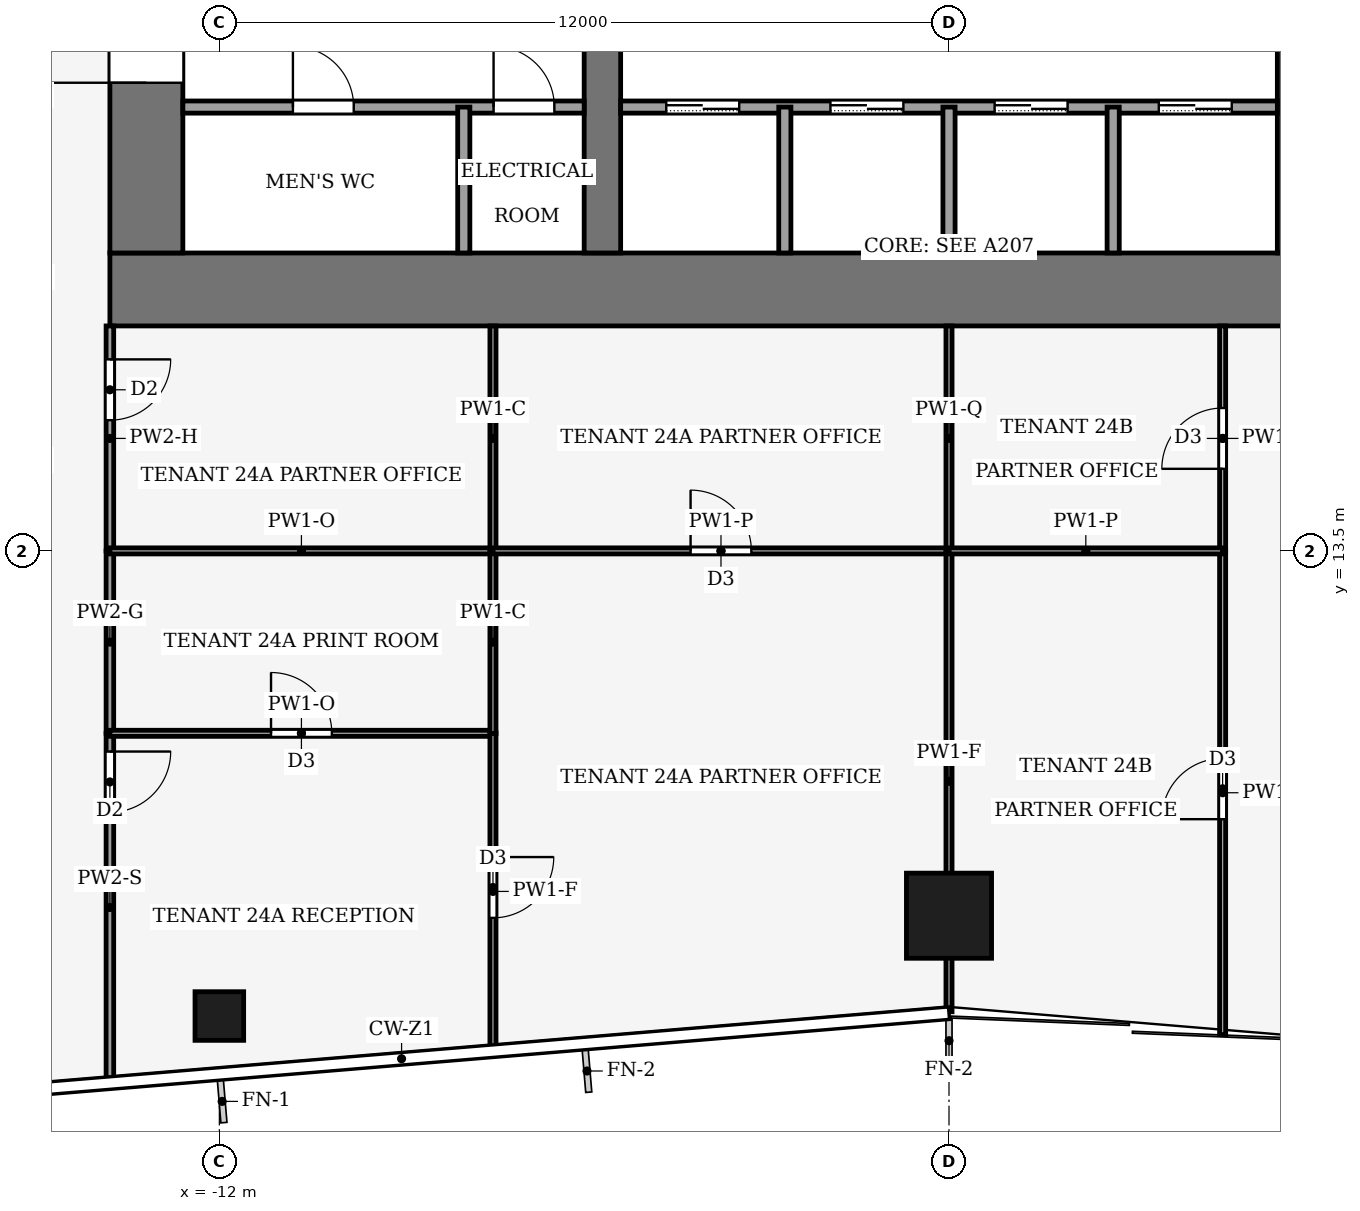
"""IFC4 building model, lengths in metres.
Left out: names, types, materials, properties, quantities, classifications, styles, units other than length and angle.
Written with IfcOpenShell. Run it as: python <this file> out.ifc"""

import sys

from ifc_helpers import new_model, si_unit, direction, frame, frame_2d, origin, origin_2d, place, context, subcontext, project, spatial, rectangle, hollow_rectangle, extrude, element, fill, save


model = new_model("IFC4")
c1 = context("Model", 3, precision=1e-05, world=origin(), true_north=direction((0.0, 1.0)))
c2 = subcontext(c1, "Body", "Model", "MODEL_VIEW")
j1 = project(units=[si_unit("LENGTHUNIT", "METRE"), si_unit("PLANEANGLEUNIT", "RADIAN")], contexts=[c1])
p1 = place(None, origin())
s1 = spatial("IfcSite", under=j1, at=p1, CompositionType="ELEMENT")
p2 = place(p1, origin())
s2 = spatial("IfcBuilding", under=s1, at=p2, CompositionType="ELEMENT")
p3 = place(p2, frame((0.0, 0.0, 106.0)))
s3 = spatial("IfcBuildingStorey", under=s2, at=p3, CompositionType="ELEMENT", Elevation=106.0)
p4 = place(p3, frame((-13.8, 17.8, -0.13), z_axis=(0.0, 0.0, 1.0), x_axis=(1.0, 0.0, 0.0)))
e1 = element("IfcWall", 1, at=p4, inside=s3, PredefinedType="SHEAR", context=c2, shape_type="SweptSolid", body=[
    extrude(rectangle(XDim=27.6, YDim=1.2, at=frame_2d((13.8, 0.0))), origin(), (0.0, 0.0, 1.0), 4.0),
])
p5 = place(p3, frame((-13.2, 18.4, -0.13), z_axis=(0.0, 0.0, 1.0), x_axis=(0.0, 1.0, 0.0)))
e2 = element("IfcWall", 2, at=p5, inside=s3, PredefinedType="SHEAR", context=c2, shape_type="SweptSolid", body=[
    extrude(rectangle(XDim=19.2, YDim=1.2, at=frame_2d((9.6, 0.0))), origin(), (0.0, 0.0, 1.0), 4.0),
])
p6 = place(p5, frame((2.8, 0.0, 0.13)))
e3 = element("IfcOpeningElement", 3, at=p6, cuts=e2, PredefinedType="OPENING", context=c2, shape_type="SweptSolid", body=[
    extrude(rectangle(XDim=2.4, YDim=2.4, at=frame_2d((1.2, 1.2))), frame((0.0, 0.61, 0.0), z_axis=(0.0, -1.0, 0.0), x_axis=(1.0, 0.0, 0.0)), (0.0, 0.0, 1.0), 1.22),
])
p7 = place(p5, frame((13.4, 0.0, 0.13)))
e4 = element("IfcOpeningElement", 4, at=p7, cuts=e2, PredefinedType="OPENING", context=c2, shape_type="SweptSolid", body=[
    extrude(rectangle(XDim=1.4, YDim=2.2, at=frame_2d((0.7, 1.1))), frame((0.0, 0.61, 0.0), z_axis=(0.0, -1.0, 0.0), x_axis=(1.0, 0.0, 0.0)), (0.0, 0.0, 1.0), 1.22),
])
p8 = place(p3, frame((-5.7, 18.4, -0.13), z_axis=(0.0, 0.0, 1.0), x_axis=(0.0, 1.0, 0.0)))
e5 = element("IfcWall", 5, at=p8, inside=s3, PredefinedType="SHEAR", context=c2, shape_type="SweptSolid", body=[
    extrude(rectangle(XDim=19.2, YDim=0.6, at=frame_2d((9.6, 0.0))), origin(), (0.0, 0.0, 1.0), 4.0),
])
p9 = place(p8, frame((8.35, 0.0, 0.13)))
e6 = element("IfcOpeningElement", 6, at=p9, cuts=e5, PredefinedType="OPENING", context=c2, shape_type="SweptSolid", body=[
    extrude(rectangle(XDim=0.9, YDim=2.1, at=frame_2d((0.45, 1.05))), frame((0.0, 0.31, 0.0), z_axis=(0.0, -1.0, 0.0), x_axis=(1.0, 0.0, 0.0)), (0.0, 0.0, 1.0), 0.62),
])
p10 = place(p3, frame((5.7, 18.4, -0.13), z_axis=(0.0, 0.0, 1.0), x_axis=(0.0, 1.0, 0.0)))
e7 = element("IfcWall", 7, at=p10, inside=s3, PredefinedType="SHEAR", context=c2, shape_type="SweptSolid", body=[
    extrude(rectangle(XDim=19.2, YDim=0.6, at=frame_2d((9.6, 0.0))), origin(), (0.0, 0.0, 1.0), 4.0),
])
p11 = place(p10, frame((8.35, 0.0, 0.13)))
e8 = element("IfcOpeningElement", 8, at=p11, cuts=e7, PredefinedType="OPENING", context=c2, shape_type="SweptSolid", body=[
    extrude(rectangle(XDim=0.9, YDim=2.1, at=frame_2d((0.45, 1.05))), frame((0.0, 0.31, 0.0), z_axis=(0.0, -1.0, 0.0), x_axis=(1.0, 0.0, 0.0)), (0.0, 0.0, 1.0), 0.62),
])
p12 = place(p10, frame((13.3, 0.0, 0.13)))
e9 = element("IfcOpeningElement", 9, at=p12, cuts=e7, PredefinedType="OPENING", context=c2, shape_type="SweptSolid", body=[
    extrude(rectangle(XDim=2.4, YDim=2.4, at=frame_2d((1.2, 1.2))), frame((0.0, 0.31, 0.0), z_axis=(0.0, -1.0, 0.0), x_axis=(1.0, 0.0, 0.0)), (0.0, 0.0, 1.0), 0.62),
])
p13 = place(p3, frame((0.0, 7.5, 0.0), z_axis=(0.0, 0.0, 1.0), x_axis=(1.0, 0.0, 0.0)))
e10 = element("IfcColumn", 10, at=p13, inside=s3, PredefinedType="COLUMN", context=c2, shape_type="SweptSolid", body=[
    extrude(hollow_rectangle(XDim=1.4, YDim=1.4, WallThickness=0.08, at=origin_2d()), origin(), (0.0, 0.0, 1.0), 4.0),
])
p14 = place(p3, frame((-12.0, 5.85, 0.0), z_axis=(0.0, 0.0, 1.0), x_axis=(1.0, 0.0, 0.0)))
e11 = element("IfcColumn", 11, at=p14, inside=s3, PredefinedType="COLUMN", context=c2, shape_type="SweptSolid", body=[
    extrude(hollow_rectangle(XDim=0.8, YDim=0.8, WallThickness=0.04, at=origin_2d()), origin(), (0.0, 0.0, 1.0), 4.0),
])
p15 = place(p3, frame((-12.6, 20.8, 0.0), z_axis=(0.0, 0.0, 1.0), x_axis=(1.0, 0.0, 0.0)))
e12 = element("IfcWall", 12, at=p15, inside=s3, PredefinedType="PARTITIONING", context=c2, shape_type="SweptSolid", body=[
    extrude(rectangle(XDim=6.6, YDim=0.2, at=frame_2d((3.3, 0.0))), origin(), (0.0, 0.0, 1.0), 3.87),
])
p16 = place(p15, frame((1.81, 0.0, 0.0)))
e13 = element("IfcOpeningElement", 13, at=p16, cuts=e12, PredefinedType="OPENING", context=c2, shape_type="SweptSolid", body=[
    extrude(rectangle(XDim=1.0, YDim=2.1, at=frame_2d((0.5, 1.05))), frame((0.0, 0.11, 0.0), z_axis=(0.0, -1.0, 0.0), x_axis=(1.0, 0.0, 0.0)), (0.0, 0.0, 1.0), 0.22),
])
p17 = place(p15, frame((5.11, 0.0, 0.0)))
e14 = element("IfcOpeningElement", 14, at=p17, cuts=e12, PredefinedType="OPENING", context=c2, shape_type="SweptSolid", body=[
    extrude(rectangle(XDim=1.0, YDim=2.1, at=frame_2d((0.5, 1.05))), frame((0.0, 0.11, 0.0), z_axis=(0.0, -1.0, 0.0), x_axis=(1.0, 0.0, 0.0)), (0.0, 0.0, 1.0), 0.22),
])
p18 = place(p3, frame((-5.4, 20.8, 0.0), z_axis=(0.0, 0.0, 1.0), x_axis=(1.0, 0.0, 0.0)))
e15 = element("IfcWall", 15, at=p18, inside=s3, PredefinedType="PARTITIONING", context=c2, shape_type="SweptSolid", body=[
    extrude(rectangle(XDim=10.8, YDim=0.2, at=frame_2d((5.4, 0.0))), origin(), (0.0, 0.0, 1.0), 3.87),
])
p19 = place(p18, frame((0.75, 0.0, 0.0)))
e16 = element("IfcOpeningElement", 16, at=p19, cuts=e15, PredefinedType="OPENING", context=c2, shape_type="SweptSolid", body=[
    extrude(rectangle(XDim=1.2, YDim=2.2, at=frame_2d((0.6, 1.1))), frame((0.0, 0.11, 0.0), z_axis=(0.0, -1.0, 0.0), x_axis=(1.0, 0.0, 0.0)), (0.0, 0.0, 1.0), 0.22),
])
p20 = place(p18, frame((3.45, 0.0, 0.0)))
e17 = element("IfcOpeningElement", 17, at=p20, cuts=e15, PredefinedType="OPENING", context=c2, shape_type="SweptSolid", body=[
    extrude(rectangle(XDim=1.2, YDim=2.2, at=frame_2d((0.6, 1.1))), frame((0.0, 0.11, 0.0), z_axis=(0.0, -1.0, 0.0), x_axis=(1.0, 0.0, 0.0)), (0.0, 0.0, 1.0), 0.22),
])
p21 = place(p18, frame((6.15, 0.0, 0.0)))
e18 = element("IfcOpeningElement", 18, at=p21, cuts=e15, PredefinedType="OPENING", context=c2, shape_type="SweptSolid", body=[
    extrude(rectangle(XDim=1.2, YDim=2.2, at=frame_2d((0.6, 1.1))), frame((0.0, 0.11, 0.0), z_axis=(0.0, -1.0, 0.0), x_axis=(1.0, 0.0, 0.0)), (0.0, 0.0, 1.0), 0.22),
])
p22 = place(p18, frame((8.85, 0.0, 0.0)))
e19 = element("IfcOpeningElement", 19, at=p22, cuts=e15, PredefinedType="OPENING", context=c2, shape_type="SweptSolid", body=[
    extrude(rectangle(XDim=1.2, YDim=2.2, at=frame_2d((0.6, 1.1))), frame((0.0, 0.11, 0.0), z_axis=(0.0, -1.0, 0.0), x_axis=(1.0, 0.0, 0.0)), (0.0, 0.0, 1.0), 0.22),
])
for number, where, z_axis, x_axis in (
    (20, (-7.98, 18.4, 0.0), (0.0, 0.0, 1.0), (0.0, 1.0, 0.0)),
    (21, (-2.7, 18.4, 0.0), (0.0, 0.0, 1.0), (0.0, 1.0, 0.0)),
    (22, (0.0, 18.4, 0.0), (0.0, 0.0, 1.0), (0.0, 1.0, 0.0)),
    (23, (2.7, 18.4, 0.0), (0.0, 0.0, 1.0), (0.0, 1.0, 0.0)),
):
    element("IfcWall", number, at=place(p3, frame(where, z_axis=z_axis, x_axis=x_axis)), inside=s3, PredefinedType="PARTITIONING", context=c2, shape_type="SweptSolid", body=[
        extrude(rectangle(XDim=2.4, YDim=0.2, at=frame_2d((1.2, 0.0))), origin(), (0.0, 0.0, 1.0), 3.87),
    ])
p23 = place(p3, frame((-13.8, 10.5, 0.0), z_axis=(0.0, 0.0, 1.0), x_axis=(0.0, -1.0, 0.0)))
e24 = element("IfcWall", 24, at=p23, inside=s3, PredefinedType="PARTITIONING", context=c2, shape_type="SweptSolid", body=[
    extrude(rectangle(XDim=5.73, YDim=0.125, at=frame_2d((2.865, 0.0))), origin(), (0.0, 0.0, 1.0), 3.04),
])
p24 = place(p23, frame((0.3, 0.0, 0.0)))
e25 = element("IfcOpeningElement", 25, at=p24, cuts=e24, PredefinedType="OPENING", context=c2, shape_type="SweptSolid", body=[
    extrude(rectangle(XDim=1.0, YDim=2.1, at=frame_2d((0.5, 1.05))), frame((0.0, 0.073, 0.0), z_axis=(0.0, -1.0, 0.0), x_axis=(1.0, 0.0, 0.0)), (0.0, 0.0, 1.0), 0.145),
])
p25 = place(p3, frame((-13.8, 10.5, 0.0), z_axis=(0.0, 0.0, 1.0), x_axis=(0.0, 1.0, 0.0)))
e26 = element("IfcWall", 26, at=p25, inside=s3, PredefinedType="PARTITIONING", context=c2, shape_type="SweptSolid", body=[
    extrude(rectangle(XDim=3.0, YDim=0.125, at=frame_2d((1.5, 0.0))), origin(), (0.0, 0.0, 1.0), 3.87),
])
p26 = place(p3, frame((-13.8, 17.2, 0.0), z_axis=(0.0, 0.0, 1.0), x_axis=(0.0, -1.0, 0.0)))
e27 = element("IfcWall", 27, at=p26, inside=s3, PredefinedType="PARTITIONING", context=c2, shape_type="SweptSolid", body=[
    extrude(rectangle(XDim=3.7, YDim=0.125, at=frame_2d((1.85, 0.0))), origin(), (0.0, 0.0, 1.0), 3.14),
])
p27 = place(p26, frame((0.55, 0.0, 0.0)))
e28 = element("IfcOpeningElement", 28, at=p27, cuts=e27, PredefinedType="OPENING", context=c2, shape_type="SweptSolid", body=[
    extrude(rectangle(XDim=1.0, YDim=2.1, at=frame_2d((0.5, 1.05))), frame((0.0, 0.073, 0.0), z_axis=(0.0, -1.0, 0.0), x_axis=(1.0, 0.0, 0.0)), (0.0, 0.0, 1.0), 0.145),
])
p28 = place(p3, frame((-13.8, 10.5, 0.0), z_axis=(0.0, 0.0, 1.0), x_axis=(1.0, 0.0, 0.0)))
e29 = element("IfcWall", 29, at=p28, inside=s3, PredefinedType="PARTITIONING", context=c2, shape_type="SweptSolid", body=[
    extrude(rectangle(XDim=6.3, YDim=0.1, at=frame_2d((3.15, 0.0))), origin(), (0.0, 0.0, 1.0), 3.39),
])
p29 = place(p28, frame((2.65, 0.0, 0.0)))
e30 = element("IfcOpeningElement", 30, at=p29, cuts=e29, PredefinedType="OPENING", context=c2, shape_type="SweptSolid", body=[
    extrude(rectangle(XDim=1.0, YDim=2.1, at=frame_2d((0.5, 1.05))), frame((0.0, 0.06, 0.0), z_axis=(0.0, -1.0, 0.0), x_axis=(1.0, 0.0, 0.0)), (0.0, 0.0, 1.0), 0.12),
])
p30 = place(p3, frame((-7.5, 10.504, 0.0), z_axis=(0.0, 0.0, 1.0), x_axis=(0.0, -1.0, 0.0)))
e31 = element("IfcWall", 31, at=p30, inside=s3, PredefinedType="PARTITIONING", context=c2, shape_type="SweptSolid", body=[
    extrude(rectangle(XDim=5.209, YDim=0.1, at=frame_2d((2.604, 0.0))), origin(), (0.0, 0.0, 1.0), 3.04),
])
p31 = place(p30, frame((2.039, 0.0, 0.0)))
e32 = element("IfcOpeningElement", 32, at=p31, cuts=e31, PredefinedType="OPENING", context=c2, shape_type="SweptSolid", body=[
    extrude(rectangle(XDim=1.0, YDim=2.1, at=frame_2d((0.5, 1.05))), frame((0.0, 0.06, 0.0), z_axis=(0.0, -1.0, 0.0), x_axis=(1.0, 0.0, 0.0)), (0.0, 0.0, 1.0), 0.12),
])
p32 = place(p3, frame((-7.5, 13.5, 0.0), z_axis=(0.0, 0.0, 1.0), x_axis=(-1.0, 0.0, 0.0)))
e33 = element("IfcWall", 33, at=p32, inside=s3, PredefinedType="PARTITIONING", context=c2, shape_type="SweptSolid", body=[
    extrude(rectangle(XDim=6.3, YDim=0.1, at=frame_2d((3.15, 0.0))), origin(), (0.0, 0.0, 1.0), 3.39),
])
p33 = place(p3, frame((-7.5, 10.496, 0.0), z_axis=(0.0, 0.0, 1.0), x_axis=(0.0, 1.0, 0.0)))
e34 = element("IfcWall", 34, at=p33, inside=s3, PredefinedType="PARTITIONING", context=c2, shape_type="SweptSolid", body=[
    extrude(rectangle(XDim=3.004, YDim=0.1, at=frame_2d((1.502, 0.0))), origin(), (0.0, 0.0, 1.0), 3.87),
])
p34 = place(p3, frame((-7.5, 13.5, 0.0), z_axis=(0.0, 0.0, 1.0), x_axis=(0.0, 1.0, 0.0)))
e35 = element("IfcWall", 35, at=p34, inside=s3, PredefinedType="PARTITIONING", context=c2, shape_type="SweptSolid", body=[
    extrude(rectangle(XDim=3.7, YDim=0.1, at=frame_2d((1.85, 0.0))), origin(), (0.0, 0.0, 1.0), 3.87),
])
p35 = place(p3, frame((-7.5, 13.5, 0.0), z_axis=(0.0, 0.0, 1.0), x_axis=(1.0, 0.0, 0.0)))
e36 = element("IfcWall", 36, at=p35, inside=s3, PredefinedType="PARTITIONING", context=c2, shape_type="SweptSolid", body=[
    extrude(rectangle(XDim=7.5, YDim=0.1, at=frame_2d((3.75, 0.0))), origin(), (0.0, 0.0, 1.0), 3.44),
])
p36 = place(p35, frame((3.25, 0.0, 0.0)))
e37 = element("IfcOpeningElement", 37, at=p36, cuts=e36, PredefinedType="OPENING", context=c2, shape_type="SweptSolid", body=[
    extrude(rectangle(XDim=1.0, YDim=2.1, at=frame_2d((0.5, 1.05))), frame((0.0, 0.06, 0.0), z_axis=(0.0, -1.0, 0.0), x_axis=(1.0, 0.0, 0.0)), (0.0, 0.0, 1.0), 0.12),
])
p37 = place(p3, frame((0.0, 5.92, 0.0), z_axis=(0.0, 0.0, 1.0), x_axis=(0.0, 1.0, 0.0)))
e38 = element("IfcWall", 38, at=p37, inside=s3, PredefinedType="PARTITIONING", context=c2, shape_type="SweptSolid", body=[
    extrude(rectangle(XDim=7.58, YDim=0.1, at=frame_2d((3.79, 0.0))), origin(), (0.0, 0.0, 1.0), 3.04),
])
p38 = place(p3, frame((0.0, 13.5, 0.0), z_axis=(0.0, 0.0, 1.0), x_axis=(0.0, 1.0, 0.0)))
e39 = element("IfcWall", 39, at=p38, inside=s3, PredefinedType="PARTITIONING", context=c2, shape_type="SweptSolid", body=[
    extrude(rectangle(XDim=3.7, YDim=0.1, at=frame_2d((1.85, 0.0))), origin(), (0.0, 0.0, 1.0), 3.48),
])
p39 = place(p3, frame((4.5, 5.545, 0.0), z_axis=(0.0, 0.0, 1.0), x_axis=(0.0, 1.0, 0.0)))
e40 = element("IfcWall", 40, at=p39, inside=s3, PredefinedType="PARTITIONING", context=c2, shape_type="SweptSolid", body=[
    extrude(rectangle(XDim=7.955, YDim=0.1, at=frame_2d((3.978, 0.0))), origin(), (0.0, 0.0, 1.0), 3.04),
])
p40 = place(p39, frame((3.542, 0.0, 0.0)))
e41 = element("IfcOpeningElement", 41, at=p40, cuts=e40, PredefinedType="OPENING", context=c2, shape_type="SweptSolid", body=[
    extrude(rectangle(XDim=1.0, YDim=2.1, at=frame_2d((0.5, 1.05))), frame((0.0, 0.06, 0.0), z_axis=(0.0, -1.0, 0.0), x_axis=(1.0, 0.0, 0.0)), (0.0, 0.0, 1.0), 0.12),
])
p41 = place(p3, frame((4.5, 13.5, 0.0), z_axis=(0.0, 0.0, 1.0), x_axis=(0.0, 1.0, 0.0)))
e42 = element("IfcWall", 42, at=p41, inside=s3, PredefinedType="PARTITIONING", context=c2, shape_type="SweptSolid", body=[
    extrude(rectangle(XDim=3.7, YDim=0.1, at=frame_2d((1.85, 0.0))), origin(), (0.0, 0.0, 1.0), 3.87),
])
p42 = place(p41, frame((1.35, 0.0, 0.0)))
e43 = element("IfcOpeningElement", 43, at=p42, cuts=e42, PredefinedType="OPENING", context=c2, shape_type="SweptSolid", body=[
    extrude(rectangle(XDim=1.0, YDim=2.1, at=frame_2d((0.5, 1.05))), frame((0.0, 0.06, 0.0), z_axis=(0.0, -1.0, 0.0), x_axis=(1.0, 0.0, 0.0)), (0.0, 0.0, 1.0), 0.12),
])
p43 = place(p3, frame((4.5, 13.5, 0.0), z_axis=(0.0, 0.0, 1.0), x_axis=(-1.0, 0.0, 0.0)))
e44 = element("IfcWall", 44, at=p43, inside=s3, PredefinedType="PARTITIONING", context=c2, shape_type="SweptSolid", body=[
    extrude(rectangle(XDim=4.5, YDim=0.1, at=frame_2d((2.25, 0.0))), origin(), (0.0, 0.0, 1.0), 3.44),
])
p44 = place(p19, origin())
e45 = element("IfcDoor", 45, at=p44, inside=s3, OperationType="SLIDING_TO_LEFT", PredefinedType="DOOR", context=c2, shape_type="SweptSolid", body=[
    extrude(rectangle(XDim=1.2, YDim=2.2, at=frame_2d((0.6, 1.1))), frame((0.0, 0.025, 0.0), z_axis=(0.0, -1.0, 0.0), x_axis=(1.0, 0.0, 0.0)), (0.0, 0.0, 1.0), 0.05),
])
fill(e16, e45)
p45 = place(p20, origin())
e46 = element("IfcDoor", 46, at=p45, inside=s3, OperationType="SLIDING_TO_LEFT", PredefinedType="DOOR", context=c2, shape_type="SweptSolid", body=[
    extrude(rectangle(XDim=1.2, YDim=2.2, at=frame_2d((0.6, 1.1))), frame((0.0, 0.025, 0.0), z_axis=(0.0, -1.0, 0.0), x_axis=(1.0, 0.0, 0.0)), (0.0, 0.0, 1.0), 0.05),
])
fill(e17, e46)
p46 = place(p21, origin())
e47 = element("IfcDoor", 47, at=p46, inside=s3, OperationType="SLIDING_TO_LEFT", PredefinedType="DOOR", context=c2, shape_type="SweptSolid", body=[
    extrude(rectangle(XDim=1.2, YDim=2.2, at=frame_2d((0.6, 1.1))), frame((0.0, 0.025, 0.0), z_axis=(0.0, -1.0, 0.0), x_axis=(1.0, 0.0, 0.0)), (0.0, 0.0, 1.0), 0.05),
])
fill(e18, e47)
p47 = place(p22, origin())
e48 = element("IfcDoor", 48, at=p47, inside=s3, OperationType="SLIDING_TO_LEFT", PredefinedType="DOOR", context=c2, shape_type="SweptSolid", body=[
    extrude(rectangle(XDim=1.2, YDim=2.2, at=frame_2d((0.6, 1.1))), frame((0.0, 0.025, 0.0), z_axis=(0.0, -1.0, 0.0), x_axis=(1.0, 0.0, 0.0)), (0.0, 0.0, 1.0), 0.05),
])
fill(e19, e48)
p48 = place(p16, origin())
e49 = element("IfcDoor", 49, at=p48, inside=s3, OperationType="SINGLE_SWING_LEFT", PredefinedType="DOOR", context=c2, shape_type="SweptSolid", body=[
    extrude(rectangle(XDim=1.0, YDim=2.1, at=frame_2d((0.5, 1.05))), frame((0.0, 0.025, 0.0), z_axis=(0.0, -1.0, 0.0), x_axis=(1.0, 0.0, 0.0)), (0.0, 0.0, 1.0), 0.05),
])
fill(e13, e49)
p49 = place(p17, origin())
e50 = element("IfcDoor", 50, at=p49, inside=s3, OperationType="SINGLE_SWING_LEFT", PredefinedType="DOOR", context=c2, shape_type="SweptSolid", body=[
    extrude(rectangle(XDim=1.0, YDim=2.1, at=frame_2d((0.5, 1.05))), frame((0.0, 0.025, 0.0), z_axis=(0.0, -1.0, 0.0), x_axis=(1.0, 0.0, 0.0)), (0.0, 0.0, 1.0), 0.05),
])
fill(e14, e50)
p50 = place(p6, origin())
e51 = element("IfcDoor", 51, at=p50, inside=s3, OperationType="DOUBLE_DOOR_SINGLE_SWING", PredefinedType="DOOR", context=c2, shape_type="SweptSolid", body=[
    extrude(rectangle(XDim=2.4, YDim=2.4, at=frame_2d((1.2, 1.2))), frame((0.0, 0.025, 0.0), z_axis=(0.0, -1.0, 0.0), x_axis=(1.0, 0.0, 0.0)), (0.0, 0.0, 1.0), 0.05),
])
fill(e3, e51)
p51 = place(p24, origin())
e52 = element("IfcDoor", 52, at=p51, inside=s3, OperationType="SINGLE_SWING_LEFT", PredefinedType="DOOR", context=c2, shape_type="SweptSolid", body=[
    extrude(rectangle(XDim=1.0, YDim=2.1, at=frame_2d((0.5, 1.05))), frame((0.0, 0.025, 0.0), z_axis=(0.0, -1.0, 0.0), x_axis=(1.0, 0.0, 0.0)), (0.0, 0.0, 1.0), 0.05),
])
fill(e25, e52)
p52 = place(p27, origin())
e53 = element("IfcDoor", 53, at=p52, inside=s3, OperationType="SINGLE_SWING_LEFT", PredefinedType="DOOR", context=c2, shape_type="SweptSolid", body=[
    extrude(rectangle(XDim=1.0, YDim=2.1, at=frame_2d((0.5, 1.05))), frame((0.0, 0.025, 0.0), z_axis=(0.0, -1.0, 0.0), x_axis=(1.0, 0.0, 0.0)), (0.0, 0.0, 1.0), 0.05),
])
fill(e28, e53)
p53 = place(p29, origin())
e54 = element("IfcDoor", 54, at=p53, inside=s3, OperationType="SINGLE_SWING_RIGHT", PredefinedType="DOOR", context=c2, shape_type="SweptSolid", body=[
    extrude(rectangle(XDim=1.0, YDim=2.1, at=frame_2d((0.5, 1.05))), frame((0.0, 0.025, 0.0), z_axis=(0.0, -1.0, 0.0), x_axis=(1.0, 0.0, 0.0)), (0.0, 0.0, 1.0), 0.05),
])
fill(e30, e54)
p54 = place(p31, origin())
e55 = element("IfcDoor", 55, at=p54, inside=s3, OperationType="SINGLE_SWING_LEFT", PredefinedType="DOOR", context=c2, shape_type="SweptSolid", body=[
    extrude(rectangle(XDim=1.0, YDim=2.1, at=frame_2d((0.5, 1.05))), frame((0.0, 0.025, 0.0), z_axis=(0.0, -1.0, 0.0), x_axis=(1.0, 0.0, 0.0)), (0.0, 0.0, 1.0), 0.05),
])
fill(e32, e55)
p55 = place(p36, origin())
e56 = element("IfcDoor", 56, at=p55, inside=s3, OperationType="SINGLE_SWING_RIGHT", PredefinedType="DOOR", context=c2, shape_type="SweptSolid", body=[
    extrude(rectangle(XDim=1.0, YDim=2.1, at=frame_2d((0.5, 1.05))), frame((0.0, 0.025, 0.0), z_axis=(0.0, -1.0, 0.0), x_axis=(1.0, 0.0, 0.0)), (0.0, 0.0, 1.0), 0.05),
])
fill(e37, e56)
p56 = place(p40, origin())
e57 = element("IfcDoor", 57, at=p56, inside=s3, OperationType="SINGLE_SWING_RIGHT", PredefinedType="DOOR", context=c2, shape_type="SweptSolid", body=[
    extrude(rectangle(XDim=1.0, YDim=2.1, at=frame_2d((0.5, 1.05))), frame((0.0, 0.025, 0.0), z_axis=(0.0, -1.0, 0.0), x_axis=(1.0, 0.0, 0.0)), (0.0, 0.0, 1.0), 0.05),
])
fill(e41, e57)
p57 = place(p42, origin())
e58 = element("IfcDoor", 58, at=p57, inside=s3, OperationType="SINGLE_SWING_LEFT", PredefinedType="DOOR", context=c2, shape_type="SweptSolid", body=[
    extrude(rectangle(XDim=1.0, YDim=2.1, at=frame_2d((0.5, 1.05))), frame((0.0, 0.025, 0.0), z_axis=(0.0, -1.0, 0.0), x_axis=(1.0, 0.0, 0.0)), (0.0, 0.0, 1.0), 0.05),
])
fill(e43, e58)
save(model, sys.argv[1])
